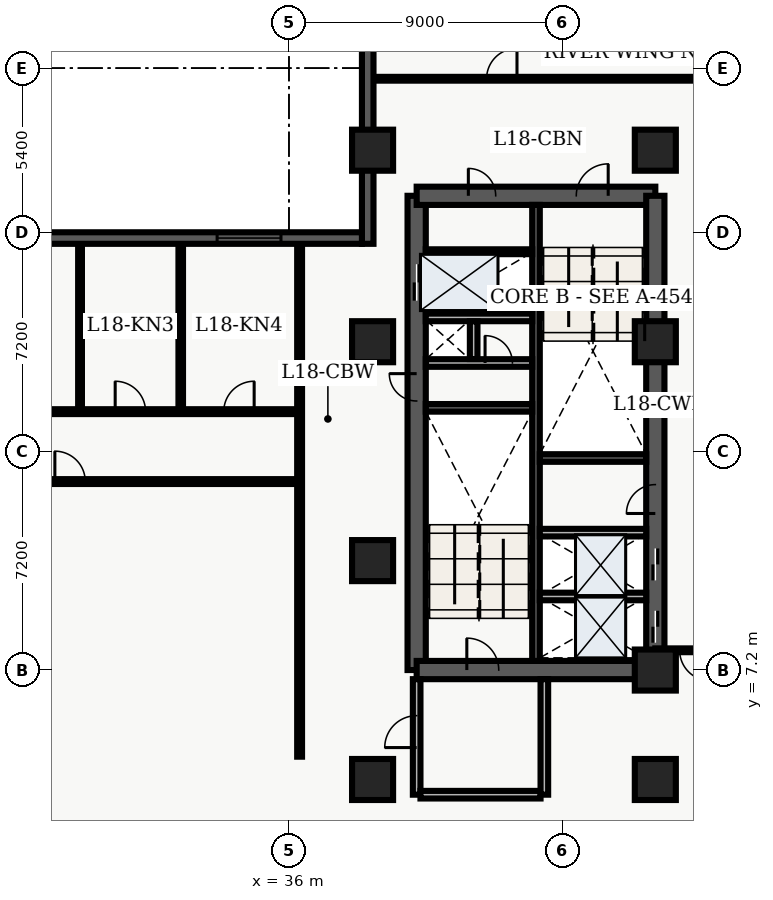
"""IFC4 building model, lengths in metres.
Left out: names, types, materials, properties, quantities, classifications, styles, units other than length and angle.
Written with IfcOpenShell. Run it as: python <this file> out.ifc"""

import sys

from ifc_helpers import new_model, entity, si_unit, converted_unit, direction, frame, origin_with_axes, origin_2d_with_axis, place, context, subcontext, project, spatial, polyline, rectangle, outline, extrude, element, fill, save


model = new_model("IFC4")
c1 = context("Model", 3, precision=1e-05, world=origin_with_axes(), true_north=direction((0.0, 1.0)))
c2 = subcontext(c1, "Body", "Model", "MODEL_VIEW")
j1 = project(units=[si_unit("LENGTHUNIT", "METRE"), converted_unit("PLANEANGLEUNIT", "DEGREE", entity("IfcPlaneAngleMeasure", 0.017), si_unit("PLANEANGLEUNIT", "RADIAN"), dimensions=[0, 0, 0, 0, 0, 0, 0])], contexts=[c1])
p1 = place(None, origin_with_axes())
s1 = spatial("IfcSite", under=j1, at=p1, CompositionType="ELEMENT")
p2 = place(p1, origin_with_axes())
s2 = spatial("IfcBuilding", under=s1, at=p2, CompositionType="ELEMENT")
p3 = place(p2, frame((0.0, 0.0, 75.6), z_axis=(0.0, 0.0, 1.0), x_axis=(1.0, 0.0, 0.0)))
s3 = spatial("IfcBuildingStorey", under=s2, at=p3, CompositionType="ELEMENT", Elevation=75.6)
p4 = place(p3, frame((40.2, 7.2, 0.0), z_axis=(0.0, 0.0, 1.0), x_axis=(0.0, 1.0, 0.0)))
e1 = element("IfcWall", 1, at=p4, inside=s3, PredefinedType="SHEAR", context=c2, shape_type="SweptSolid", body=[
    extrude(outline(polyline([(0.0, -0.3), (15.6, -0.3), (15.6, 0.3), (0.0, 0.3), (0.0, -0.3)])), origin_with_axes(), (0.0, 0.0, 1.0), 3.6),
])
p5 = place(p4, frame((12.75, 0.0, 0.0), z_axis=(0.0, 0.0, 1.0), x_axis=(1.0, 0.0, 0.0)))
e2 = element("IfcOpeningElement", 2, at=p5, cuts=e1, PredefinedType="OPENING", context=c2, shape_type="SweptSolid", body=[
    extrude(rectangle(XDim=1.2, YDim=0.62, at=origin_2d_with_axis()), origin_with_axes(), (0.0, 0.0, 1.0), 2.15),
])
p6 = place(p4, frame((9.3, 0.0, 0.0), z_axis=(0.0, 0.0, 1.0), x_axis=(1.0, 0.0, 0.0)))
e3 = element("IfcOpeningElement", 3, at=p6, cuts=e1, PredefinedType="OPENING", context=c2, shape_type="SweptSolid", body=[
    extrude(rectangle(XDim=0.9, YDim=0.62, at=origin_2d_with_axis()), origin_with_axes(), (0.0, 0.0, 1.0), 2.15),
])
p7 = place(p3, frame((40.2, 7.2, 0.0), z_axis=(0.0, 0.0, 1.0), x_axis=(1.0, 0.0, 0.0)))
e4 = element("IfcWall", 4, at=p7, inside=s3, PredefinedType="SHEAR", context=c2, shape_type="SweptSolid", body=[
    extrude(outline(polyline([(0.0, -0.3), (7.85, -0.3), (7.85, 0.3), (0.0, 0.3), (0.0, -0.3)])), origin_with_axes(), (0.0, 0.0, 1.0), 3.6),
])
p8 = place(p7, frame((2.175, 0.0, 0.0), z_axis=(0.0, 0.0, 1.0), x_axis=(1.0, 0.0, 0.0)))
e5 = element("IfcOpeningElement", 5, at=p8, cuts=e4, PredefinedType="OPENING", context=c2, shape_type="SweptSolid", body=[
    extrude(rectangle(XDim=1.05, YDim=0.62, at=origin_2d_with_axis()), origin_with_axes(), (0.0, 0.0, 1.0), 2.15),
])
p9 = place(p3, frame((40.2, 22.8, 0.0), z_axis=(0.0, 0.0, 1.0), x_axis=(1.0, 0.0, 0.0)))
e6 = element("IfcWall", 6, at=p9, inside=s3, PredefinedType="SHEAR", context=c2, shape_type="SweptSolid", body=[
    extrude(outline(polyline([(0.0, -0.3), (7.85, -0.3), (7.85, 0.3), (0.0, 0.3), (0.0, -0.3)])), origin_with_axes(), (0.0, 0.0, 1.0), 3.6),
])
p10 = place(p9, frame((5.775, 0.0, 0.0), z_axis=(0.0, 0.0, 1.0), x_axis=(1.0, 0.0, 0.0)))
e7 = element("IfcOpeningElement", 7, at=p10, cuts=e6, PredefinedType="OPENING", context=c2, shape_type="SweptSolid", body=[
    extrude(rectangle(XDim=1.05, YDim=0.62, at=origin_2d_with_axis()), origin_with_axes(), (0.0, 0.0, 1.0), 2.15),
])
p11 = place(p9, frame((2.15, 0.0, 0.0), z_axis=(0.0, 0.0, 1.0), x_axis=(1.0, 0.0, 0.0)))
e8 = element("IfcOpeningElement", 8, at=p11, cuts=e6, PredefinedType="OPENING", context=c2, shape_type="SweptSolid", body=[
    extrude(rectangle(XDim=0.9, YDim=0.62, at=origin_2d_with_axis()), origin_with_axes(), (0.0, 0.0, 1.0), 2.15),
])
p12 = place(p3, frame((48.05, 7.2, 0.0), z_axis=(0.0, 0.0, 1.0), x_axis=(0.0, 1.0, 0.0)))
e9 = element("IfcWall", 9, at=p12, inside=s3, PredefinedType="SHEAR", context=c2, shape_type="SweptSolid", body=[
    extrude(outline(polyline([(0.0, -0.3), (15.6, -0.3), (15.6, 0.3), (0.0, 0.3), (0.0, -0.3)])), origin_with_axes(), (0.0, 0.0, 1.0), 3.6),
])
p13 = place(p12, frame((1.425, 0.0, 0.0), z_axis=(0.0, 0.0, 1.0), x_axis=(1.0, 0.0, 0.0)))
e10 = element("IfcOpeningElement", 10, at=p13, cuts=e9, PredefinedType="OPENING", context=c2, shape_type="SweptSolid", body=[
    extrude(rectangle(XDim=1.05, YDim=0.62, at=origin_2d_with_axis()), origin_with_axes(), (0.0, 0.0, 1.0), 2.15),
])
p14 = place(p12, frame((3.475, 0.0, 0.0), z_axis=(0.0, 0.0, 1.0), x_axis=(1.0, 0.0, 0.0)))
e11 = element("IfcOpeningElement", 11, at=p14, cuts=e9, PredefinedType="OPENING", context=c2, shape_type="SweptSolid", body=[
    extrude(rectangle(XDim=1.05, YDim=0.62, at=origin_2d_with_axis()), origin_with_axes(), (0.0, 0.0, 1.0), 2.15),
])
p15 = place(p12, frame((5.625, 0.0, 0.0), z_axis=(0.0, 0.0, 1.0), x_axis=(1.0, 0.0, 0.0)))
e12 = element("IfcOpeningElement", 12, at=p15, cuts=e9, PredefinedType="OPENING", context=c2, shape_type="SweptSolid", body=[
    extrude(rectangle(XDim=0.95, YDim=0.62, at=origin_2d_with_axis()), origin_with_axes(), (0.0, 0.0, 1.0), 2.15),
])
p16 = place(p3, frame((44.125, 7.5, 0.0), z_axis=(0.0, 0.0, 1.0), x_axis=(0.0, 1.0, 0.0)))
e13 = element("IfcWall", 13, at=p16, inside=s3, PredefinedType="SHEAR", context=c2, shape_type="SweptSolid", body=[
    extrude(outline(polyline([(0.0, -0.125), (15.0, -0.125), (15.0, 0.125), (0.0, 0.125), (0.0, -0.125)])), origin_with_axes(), (0.0, 0.0, 1.0), 3.6),
])
for number, where, z_axis, x_axis in (
    (14, (40.5, 15.825, 0.0), (0.0, 0.0, 1.0), (1.0, 0.0, 0.0)),
    (15, (44.25, 14.175, 0.0), (0.0, 0.0, 1.0), (1.0, 0.0, 0.0)),
):
    element("IfcWall", number, at=place(p3, frame(where, z_axis=z_axis, x_axis=x_axis)), inside=s3, PredefinedType="SHEAR", context=c2, shape_type="SweptSolid", body=[
        extrude(outline(polyline([(0.0, -0.125), (3.5, -0.125), (3.5, 0.125), (0.0, 0.125), (0.0, -0.125)])), origin_with_axes(), (0.0, 0.0, 1.0), 3.6),
    ])
p17 = place(p3, frame((40.5, 17.3, 0.0), z_axis=(0.0, 0.0, 1.0), x_axis=(1.0, 0.0, 0.0)))
e16 = element("IfcWall", 16, at=p17, inside=s3, PredefinedType="SOLIDWALL", context=c2, shape_type="SweptSolid", body=[
    extrude(outline(polyline([(0.0, -0.125), (3.5, -0.125), (3.5, 0.125), (0.0, 0.125), (0.0, -0.125)])), origin_with_axes(), (0.0, 0.0, 1.0), 2.64),
])
p18 = place(p17, frame((2.4, 0.0, 0.0), z_axis=(0.0, 0.0, 1.0), x_axis=(1.0, 0.0, 0.0)))
e17 = element("IfcOpeningElement", 17, at=p18, cuts=e16, PredefinedType="OPENING", context=c2, shape_type="SweptSolid", body=[
    extrude(rectangle(XDim=0.9, YDim=0.27, at=origin_2d_with_axis()), origin_with_axes(), (0.0, 0.0, 1.0), 2.15),
])
p19 = place(p3, frame((40.5, 18.8, 0.0), z_axis=(0.0, 0.0, 1.0), x_axis=(1.0, 0.0, 0.0)))
e18 = element("IfcWall", 18, at=p19, inside=s3, PredefinedType="SOLIDWALL", context=c2, shape_type="SweptSolid", body=[
    extrude(outline(polyline([(0.0, -0.125), (3.5, -0.125), (3.5, 0.125), (0.0, 0.125), (0.0, -0.125)])), origin_with_axes(), (0.0, 0.0, 1.0), 2.64),
])
p20 = place(p3, frame((42.075, 17.43, 0.0), z_axis=(0.0, 0.0, 1.0), x_axis=(0.0, 1.0, 0.0)))
e19 = element("IfcWall", 19, at=p20, inside=s3, PredefinedType="SOLIDWALL", context=c2, shape_type="SweptSolid", body=[
    extrude(outline(polyline([(0.0, -0.125), (1.24, -0.125), (1.24, 0.125), (0.0, 0.125), (0.0, -0.125)])), origin_with_axes(), (0.0, 0.0, 1.0), 2.64),
])
p21 = place(p3, frame((40.2, 3.1, 0.0), z_axis=(0.0, 0.0, 1.0), x_axis=(0.0, 1.0, 0.0)))
e20 = element("IfcWall", 20, at=p21, inside=s3, PredefinedType="SOLIDWALL", context=c2, shape_type="SweptSolid", body=[
    extrude(outline(polyline([(0.0, -0.125), (3.8, -0.125), (3.8, 0.125), (0.0, 0.125), (0.0, -0.125)])), origin_with_axes(), (0.0, 0.0, 1.0), 2.64),
])
p22 = place(p21, frame((2.075, 0.0, 0.0), z_axis=(0.0, 0.0, 1.0), x_axis=(1.0, 0.0, 0.0)))
e21 = element("IfcOpeningElement", 21, at=p22, cuts=e20, PredefinedType="OPENING", context=c2, shape_type="SweptSolid", body=[
    extrude(rectangle(XDim=1.05, YDim=0.27, at=origin_2d_with_axis()), origin_with_axes(), (0.0, 0.0, 1.0), 2.15),
])
p23 = place(p3, frame((40.325, 3.1, 0.0), z_axis=(0.0, 0.0, 1.0), x_axis=(1.0, 0.0, 0.0)))
e22 = element("IfcWall", 22, at=p23, inside=s3, PredefinedType="SOLIDWALL", context=c2, shape_type="SweptSolid", body=[
    extrude(outline(polyline([(0.0, -0.125), (3.95, -0.125), (3.95, 0.125), (0.0, 0.125), (0.0, -0.125)])), origin_with_axes(), (0.0, 0.0, 1.0), 2.64),
])
p24 = place(p3, frame((44.4, 3.1, 0.0), z_axis=(0.0, 0.0, 1.0), x_axis=(0.0, 1.0, 0.0)))
e23 = element("IfcWall", 23, at=p24, inside=s3, PredefinedType="SOLIDWALL", context=c2, shape_type="SweptSolid", body=[
    extrude(outline(polyline([(0.0, -0.125), (3.8, -0.125), (3.8, 0.125), (0.0, 0.125), (0.0, -0.125)])), origin_with_axes(), (0.0, 0.0, 1.0), 2.64),
])
for number, where, z_axis, x_axis in (
    (24, (38.75, 3.6, 0.0), (0.0, 0.0, 1.0), (1.0, 0.0, 0.0)),
    (25, (38.75, 10.8, 0.0), (0.0, 0.0, 1.0), (1.0, 0.0, 0.0)),
    (26, (38.75, 18.0, 0.0), (0.0, 0.0, 1.0), (1.0, 0.0, 0.0)),
    (27, (38.75, 24.3, 0.0), (0.0, 0.0, 1.0), (1.0, 0.0, 0.0)),
    (28, (48.05, 3.6, 0.0), (0.0, 0.0, 1.0), (1.0, 0.0, 0.0)),
    (29, (48.05, 7.2, 0.0), (0.0, 0.0, 1.0), (1.0, 0.0, 0.0)),
    (30, (48.05, 18.0, 0.0), (0.0, 0.0, 1.0), (1.0, 0.0, 0.0)),
    (31, (48.05, 24.3, 0.0), (0.0, 0.0, 1.0), (1.0, 0.0, 0.0)),
):
    element("IfcColumn", number, at=place(p3, frame(where, z_axis=z_axis, x_axis=x_axis)), inside=s3, PredefinedType="COLUMN", context=c2, shape_type="SweptSolid", body=[
        extrude(rectangle(XDim=1.35, YDim=1.35, at=origin_2d_with_axis()), origin_with_axes(), (0.0, 0.0, 1.0), 3.9),
    ])
p25 = place(p3, frame((40.5, 20.96, 0.0), z_axis=(0.0, 0.0, 1.0), x_axis=(1.0, 0.0, 0.0)))
e32 = element("IfcWall", 32, at=p25, inside=s3, PredefinedType="PARTITIONING", context=c2, shape_type="SweptSolid", body=[
    extrude(outline(polyline([(0.0, -0.08), (3.5, -0.08), (3.5, 0.08), (0.0, 0.08), (0.0, -0.08)])), origin_with_axes(), (0.0, 0.0, 1.0), 2.64),
])
for number, where, z_axis, x_axis in (
    (33, (44.25, 9.62, 0.0), (0.0, 0.0, 1.0), (1.0, 0.0, 0.0)),
    (34, (44.25, 11.72, 0.0), (0.0, 0.0, 1.0), (1.0, 0.0, 0.0)),
):
    element("IfcWall", number, at=place(p3, frame(where, z_axis=z_axis, x_axis=x_axis)), inside=s3, PredefinedType="SOLIDWALL", context=c2, shape_type="SweptSolid", body=[
        extrude(outline(polyline([(0.0, -0.125), (3.5, -0.125), (3.5, 0.125), (0.0, 0.125), (0.0, -0.125)])), origin_with_axes(), (0.0, 0.0, 1.0), 2.64),
    ])
p26 = place(p3, frame((21.15, 13.4, 0.0), z_axis=(0.0, 0.0, 1.0), x_axis=(1.0, 0.0, 0.0)))
e35 = element("IfcWall", 35, at=p26, inside=s3, PredefinedType="PARTITIONING", context=c2, shape_type="SweptSolid", body=[
    extrude(outline(polyline([(0.0, -0.08), (15.2, -0.08), (15.2, 0.08), (0.0, 0.08), (0.0, -0.08)])), origin_with_axes(), (0.0, 0.0, 1.0), 2.64),
])
p27 = place(p26, frame((7.65, 0.0, 0.0), z_axis=(0.0, 0.0, 1.0), x_axis=(1.0, 0.0, 0.0)))
e36 = element("IfcOpeningElement", 36, at=p27, cuts=e35, PredefinedType="OPENING", context=c2, shape_type="SweptSolid", body=[
    extrude(rectangle(XDim=1.0, YDim=0.18, at=origin_2d_with_axis()), origin_with_axes(), (0.0, 0.0, 1.0), 2.15),
])
p28 = place(p3, frame((21.15, 15.7, 0.0), z_axis=(0.0, 0.0, 1.0), x_axis=(1.0, 0.0, 0.0)))
e37 = element("IfcWall", 37, at=p28, inside=s3, PredefinedType="PARTITIONING", context=c2, shape_type="SweptSolid", body=[
    extrude(outline(polyline([(0.0, -0.08), (15.2, -0.08), (15.2, 0.08), (0.0, 0.08), (0.0, -0.08)])), origin_with_axes(), (0.0, 0.0, 1.0), 2.64),
])
p29 = place(p28, frame((2.562, 0.0, 0.0), z_axis=(0.0, 0.0, 1.0), x_axis=(1.0, 0.0, 0.0)))
e38 = element("IfcOpeningElement", 38, at=p29, cuts=e37, PredefinedType="OPENING", context=c2, shape_type="SweptSolid", body=[
    extrude(rectangle(XDim=1.0, YDim=0.18, at=origin_2d_with_axis()), origin_with_axes(), (0.0, 0.0, 1.0), 2.15),
])
p30 = place(p28, frame((6.462, 0.0, 0.0), z_axis=(0.0, 0.0, 1.0), x_axis=(1.0, 0.0, 0.0)))
e39 = element("IfcOpeningElement", 39, at=p30, cuts=e37, PredefinedType="OPENING", context=c2, shape_type="SweptSolid", body=[
    extrude(rectangle(XDim=1.0, YDim=0.18, at=origin_2d_with_axis()), origin_with_axes(), (0.0, 0.0, 1.0), 2.15),
])
p31 = place(p28, frame((9.634, 0.0, 0.0), z_axis=(0.0, 0.0, 1.0), x_axis=(1.0, 0.0, 0.0)))
e40 = element("IfcOpeningElement", 40, at=p31, cuts=e37, PredefinedType="OPENING", context=c2, shape_type="SweptSolid", body=[
    extrude(rectangle(XDim=1.0, YDim=0.18, at=origin_2d_with_axis()), origin_with_axes(), (0.0, 0.0, 1.0), 2.15),
])
p32 = place(p28, frame((13.205, 0.0, 0.0), z_axis=(0.0, 0.0, 1.0), x_axis=(1.0, 0.0, 0.0)))
e41 = element("IfcOpeningElement", 41, at=p32, cuts=e37, PredefinedType="OPENING", context=c2, shape_type="SweptSolid", body=[
    extrude(rectangle(XDim=1.0, YDim=0.18, at=origin_2d_with_axis()), origin_with_axes(), (0.0, 0.0, 1.0), 2.15),
])
p33 = place(p3, frame((36.35, 4.35, 0.0), z_axis=(0.0, 0.0, 1.0), x_axis=(0.0, 1.0, 0.0)))
e42 = element("IfcWall", 42, at=p33, inside=s3, PredefinedType="PARTITIONING", context=c2, shape_type="SweptSolid", body=[
    extrude(outline(polyline([(0.0, -0.08), (16.95, -0.08), (16.95, 0.08), (0.0, 0.08), (0.0, -0.08)])), origin_with_axes(), (0.0, 0.0, 1.0), 2.64),
])
p34 = place(p3, frame((29.128, 15.82, 0.0), z_axis=(0.0, 0.0, 1.0), x_axis=(0.0, 1.0, 0.0)))
e43 = element("IfcWall", 43, at=p34, inside=s3, PredefinedType="PARTITIONING", context=c2, shape_type="SweptSolid", body=[
    extrude(outline(polyline([(0.0, -0.062), (5.405, -0.062), (5.405, 0.062), (0.0, 0.062), (0.0, -0.062)])), origin_with_axes(), (0.0, 0.0, 1.0), 2.64),
])
p35 = place(p3, frame((32.44, 15.82, 0.0), z_axis=(0.0, 0.0, 1.0), x_axis=(0.0, 1.0, 0.0)))
e44 = element("IfcWall", 44, at=p35, inside=s3, PredefinedType="PARTITIONING", context=c2, shape_type="SweptSolid", body=[
    extrude(outline(polyline([(0.0, -0.075), (5.405, -0.075), (5.405, 0.075), (0.0, 0.075), (0.0, -0.075)])), origin_with_axes(), (0.0, 0.0, 1.0), 2.64),
])
p36 = place(p3, frame((59.64, 7.85, 0.0), z_axis=(0.0, 0.0, 1.0), x_axis=(-1.0, 0.0, 0.0)))
e45 = element("IfcWall", 45, at=p36, inside=s3, PredefinedType="PARTITIONING", context=c2, shape_type="SweptSolid", body=[
    extrude(outline(polyline([(0.0, -0.062), (11.59, -0.062), (11.59, 0.062), (0.0, 0.062), (0.0, -0.062)])), origin_with_axes(), (0.0, 0.0, 1.0), 2.64),
])
p37 = place(p36, frame((10.29, 0.0, 0.0), z_axis=(0.0, 0.0, 1.0), x_axis=(1.0, 0.0, 0.0)))
e46 = element("IfcOpeningElement", 46, at=p37, cuts=e45, PredefinedType="OPENING", context=c2, shape_type="SweptSolid", body=[
    extrude(rectangle(XDim=1.0, YDim=0.145, at=origin_2d_with_axis()), origin_with_axes(), (0.0, 0.0, 1.0), 2.15),
])
p38 = place(p3, frame((38.76, 26.65, 0.0), z_axis=(0.0, 0.0, 1.0), x_axis=(1.0, 0.0, 0.0)))
e47 = element("IfcWall", 47, at=p38, inside=s3, PredefinedType="PARTITIONING", context=c2, shape_type="SweptSolid", body=[
    extrude(outline(polyline([(0.0, -0.062), (20.88, -0.062), (20.88, 0.062), (0.0, 0.062), (0.0, -0.062)])), origin_with_axes(), (0.0, 0.0, 1.0), 2.64),
])
p39 = place(p38, frame((4.24, 0.0, 0.0), z_axis=(0.0, 0.0, 1.0), x_axis=(1.0, 0.0, 0.0)))
e48 = element("IfcOpeningElement", 48, at=p39, cuts=e47, PredefinedType="OPENING", context=c2, shape_type="SweptSolid", body=[
    extrude(rectangle(XDim=1.0, YDim=0.145, at=origin_2d_with_axis()), origin_with_axes(), (0.0, 0.0, 1.0), 2.15),
])
p40 = place(p3, frame((38.59, 21.22, 0.0), z_axis=(0.0, 0.0, 1.0), x_axis=(0.0, 1.0, 0.0)))
e49 = element("IfcWall", 49, at=p40, inside=s3, PredefinedType="SOLIDWALL", context=c2, shape_type="SweptSolid", body=[
    extrude(outline(polyline([(0.0, -0.19), (7.58, -0.19), (7.58, 0.19), (0.0, 0.19), (0.0, -0.19)])), origin_with_axes(), (0.0, 0.0, 1.0), 3.6),
])
p41 = place(p3, frame((21.22, 21.41, 0.0), z_axis=(0.0, 0.0, 1.0), x_axis=(1.0, 0.0, 0.0)))
e50 = element("IfcWall", 50, at=p41, inside=s3, PredefinedType="SOLIDWALL", context=c2, shape_type="SweptSolid", body=[
    extrude(outline(polyline([(0.0, -0.19), (17.18, -0.19), (17.18, 0.19), (0.0, 0.19), (0.0, -0.19)])), origin_with_axes(), (0.0, 0.0, 1.0), 3.6),
])
p42 = place(p41, frame((3.263, 0.0, 0.45), z_axis=(0.0, 0.0, 1.0), x_axis=(1.0, 0.0, 0.0)))
e51 = element("IfcOpeningElement", 51, at=p42, cuts=e50, PredefinedType="OPENING", context=c2, shape_type="SweptSolid", body=[
    extrude(rectangle(XDim=2.1, YDim=0.4, at=origin_2d_with_axis()), origin_with_axes(), (0.0, 0.0, 1.0), 2.2),
])
p43 = place(p41, frame((13.467, 0.0, 0.45), z_axis=(0.0, 0.0, 1.0), x_axis=(1.0, 0.0, 0.0)))
e52 = element("IfcOpeningElement", 52, at=p43, cuts=e50, PredefinedType="OPENING", context=c2, shape_type="SweptSolid", body=[
    extrude(rectangle(XDim=2.1, YDim=0.4, at=origin_2d_with_axis()), origin_with_axes(), (0.0, 0.0, 1.0), 2.2),
])
p44 = place(p12, frame((1.425, 0.0, 0.0), z_axis=(0.0, 0.0, 1.0), x_axis=(1.0, 0.0, 0.0)))
e53 = element("IfcDoor", 53, at=p44, inside=s3, OperationType="SLIDING_TO_LEFT", PredefinedType="DOOR", context=c2, shape_type="SweptSolid", body=[
    extrude(rectangle(XDim=1.05, YDim=0.09, at=origin_2d_with_axis()), origin_with_axes(), (0.0, 0.0, 1.0), 2.15),
])
fill(e10, e53)
p45 = place(p12, frame((3.475, 0.0, 0.0), z_axis=(0.0, 0.0, 1.0), x_axis=(1.0, 0.0, 0.0)))
e54 = element("IfcDoor", 54, at=p45, inside=s3, OperationType="SLIDING_TO_RIGHT", PredefinedType="DOOR", context=c2, shape_type="SweptSolid", body=[
    extrude(rectangle(XDim=1.05, YDim=0.09, at=origin_2d_with_axis()), origin_with_axes(), (0.0, 0.0, 1.0), 2.15),
])
fill(e11, e54)
p46 = place(p4, frame((12.75, 0.0, 0.0), z_axis=(0.0, 0.0, 1.0), x_axis=(1.0, 0.0, 0.0)))
e55 = element("IfcDoor", 55, at=p46, inside=s3, OperationType="DOUBLE_DOOR_SLIDING", PredefinedType="DOOR", context=c2, shape_type="SweptSolid", body=[
    extrude(rectangle(XDim=1.2, YDim=0.09, at=origin_2d_with_axis()), origin_with_axes(), (0.0, 0.0, 1.0), 2.15),
])
fill(e2, e55)
p47 = place(p4, frame((9.3, 0.0, 0.0), z_axis=(0.0, 0.0, 1.0), x_axis=(1.0, 0.0, 0.0)))
e56 = element("IfcDoor", 56, at=p47, inside=s3, OperationType="SINGLE_SWING_RIGHT", PredefinedType="DOOR", context=c2, shape_type="SweptSolid", body=[
    extrude(rectangle(XDim=0.9, YDim=0.09, at=origin_2d_with_axis()), origin_with_axes(), (0.0, 0.0, 1.0), 2.15),
])
fill(e3, e56)
p48 = place(p17, frame((2.4, 0.0, 0.0), z_axis=(0.0, 0.0, 1.0), x_axis=(1.0, 0.0, 0.0)))
e57 = element("IfcDoor", 57, at=p48, inside=s3, OperationType="SINGLE_SWING_LEFT", PredefinedType="DOOR", context=c2, shape_type="SweptSolid", body=[
    extrude(rectangle(XDim=0.9, YDim=0.09, at=origin_2d_with_axis()), origin_with_axes(), (0.0, 0.0, 1.0), 2.15),
])
fill(e17, e57)
p49 = place(p7, frame((2.175, 0.0, 0.0), z_axis=(0.0, 0.0, 1.0), x_axis=(1.0, 0.0, 0.0)))
e58 = element("IfcDoor", 58, at=p49, inside=s3, OperationType="SINGLE_SWING_LEFT", PredefinedType="DOOR", context=c2, shape_type="SweptSolid", body=[
    extrude(rectangle(XDim=1.05, YDim=0.09, at=origin_2d_with_axis()), origin_with_axes(), (0.0, 0.0, 1.0), 2.15),
])
fill(e5, e58)
p50 = place(p9, frame((5.775, 0.0, 0.0), z_axis=(0.0, 0.0, 1.0), x_axis=(1.0, 0.0, 0.0)))
e59 = element("IfcDoor", 59, at=p50, inside=s3, OperationType="SINGLE_SWING_RIGHT", PredefinedType="DOOR", context=c2, shape_type="SweptSolid", body=[
    extrude(rectangle(XDim=1.05, YDim=0.09, at=origin_2d_with_axis()), origin_with_axes(), (0.0, 0.0, 1.0), 2.15),
])
fill(e7, e59)
p51 = place(p21, frame((2.075, 0.0, 0.0), z_axis=(0.0, 0.0, 1.0), x_axis=(1.0, 0.0, 0.0)))
e60 = element("IfcDoor", 60, at=p51, inside=s3, OperationType="SINGLE_SWING_LEFT", PredefinedType="DOOR", context=c2, shape_type="SweptSolid", body=[
    extrude(rectangle(XDim=1.05, YDim=0.09, at=origin_2d_with_axis()), origin_with_axes(), (0.0, 0.0, 1.0), 2.15),
])
fill(e21, e60)
p52 = place(p9, frame((2.15, 0.0, 0.0), z_axis=(0.0, 0.0, 1.0), x_axis=(1.0, 0.0, 0.0)))
e61 = element("IfcDoor", 61, at=p52, inside=s3, OperationType="SINGLE_SWING_LEFT", PredefinedType="DOOR", context=c2, shape_type="SweptSolid", body=[
    extrude(rectangle(XDim=0.9, YDim=0.09, at=origin_2d_with_axis()), origin_with_axes(), (0.0, 0.0, 1.0), 2.15),
])
fill(e8, e61)
p53 = place(p12, frame((5.625, 0.0, 0.0), z_axis=(0.0, 0.0, 1.0), x_axis=(1.0, 0.0, 0.0)))
e62 = element("IfcDoor", 62, at=p53, inside=s3, OperationType="SINGLE_SWING_LEFT", PredefinedType="DOOR", context=c2, shape_type="SweptSolid", body=[
    extrude(rectangle(XDim=0.95, YDim=0.09, at=origin_2d_with_axis()), origin_with_axes(), (0.0, 0.0, 1.0), 2.15),
])
fill(e12, e62)
p54 = place(p26, frame((7.65, 0.0, 0.0), z_axis=(0.0, 0.0, 1.0), x_axis=(1.0, 0.0, 0.0)))
e63 = element("IfcDoor", 63, at=p54, inside=s3, OperationType="SINGLE_SWING_LEFT", PredefinedType="DOOR", context=c2, shape_type="SweptSolid", body=[
    extrude(rectangle(XDim=1.0, YDim=0.09, at=origin_2d_with_axis()), origin_with_axes(), (0.0, 0.0, 1.0), 2.15),
])
fill(e36, e63)
p55 = place(p28, frame((9.634, 0.0, 0.0), z_axis=(0.0, 0.0, 1.0), x_axis=(1.0, 0.0, 0.0)))
e64 = element("IfcDoor", 64, at=p55, inside=s3, OperationType="SINGLE_SWING_LEFT", PredefinedType="DOOR", context=c2, shape_type="SweptSolid", body=[
    extrude(rectangle(XDim=1.0, YDim=0.09, at=origin_2d_with_axis()), origin_with_axes(), (0.0, 0.0, 1.0), 2.15),
])
fill(e40, e64)
p56 = place(p28, frame((13.205, 0.0, 0.0), z_axis=(0.0, 0.0, 1.0), x_axis=(1.0, 0.0, 0.0)))
e65 = element("IfcDoor", 65, at=p56, inside=s3, OperationType="SINGLE_SWING_RIGHT", PredefinedType="DOOR", context=c2, shape_type="SweptSolid", body=[
    extrude(rectangle(XDim=1.0, YDim=0.09, at=origin_2d_with_axis()), origin_with_axes(), (0.0, 0.0, 1.0), 2.15),
])
fill(e41, e65)
p57 = place(p36, frame((10.29, 0.0, 0.0), z_axis=(0.0, 0.0, 1.0), x_axis=(1.0, 0.0, 0.0)))
e66 = element("IfcDoor", 66, at=p57, inside=s3, OperationType="SINGLE_SWING_LEFT", PredefinedType="DOOR", context=c2, shape_type="SweptSolid", body=[
    extrude(rectangle(XDim=1.0, YDim=0.075, at=origin_2d_with_axis()), origin_with_axes(), (0.0, 0.0, 1.0), 2.15),
])
fill(e46, e66)
p58 = place(p38, frame((4.24, 0.0, 0.0), z_axis=(0.0, 0.0, 1.0), x_axis=(1.0, 0.0, 0.0)))
e67 = element("IfcDoor", 67, at=p58, inside=s3, OperationType="SINGLE_SWING_RIGHT", PredefinedType="DOOR", context=c2, shape_type="SweptSolid", body=[
    extrude(rectangle(XDim=1.0, YDim=0.075, at=origin_2d_with_axis()), origin_with_axes(), (0.0, 0.0, 1.0), 2.15),
])
fill(e48, e67)
p59 = place(p41, frame((13.467, 0.0, 0.45), z_axis=(0.0, 0.0, 1.0), x_axis=(1.0, 0.0, 0.0)))
e68 = element("IfcWindow", 68, at=p59, inside=s3, PredefinedType="WINDOW", context=c2, shape_type="SweptSolid", body=[
    extrude(rectangle(XDim=2.1, YDim=0.09, at=origin_2d_with_axis()), origin_with_axes(), (0.0, 0.0, 1.0), 2.2),
])
fill(e52, e68)
save(model, sys.argv[1])
